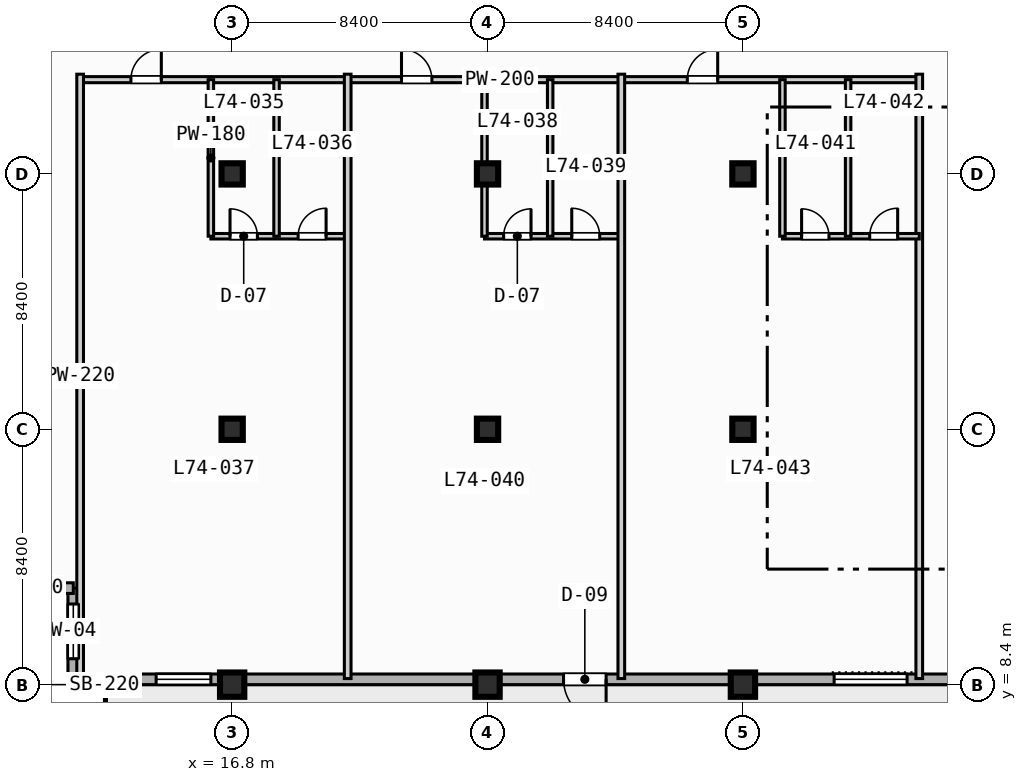
"""IFC4 building model, lengths in metres.
Left out: names, types, materials, properties, quantities, classifications, styles, units other than length and angle.
Written with IfcOpenShell. Run it as: python <this file> out.ifc"""

import sys

from ifc_helpers import new_model, si_unit, direction, frame, frame_2d, origin, origin_2d, place, context, subcontext, project, spatial, rectangle, extrude, element, fill, save


model = new_model("IFC4")
c1 = context("Model", 3, precision=1e-05, world=origin(), true_north=direction((0.0, 1.0)))
c2 = subcontext(c1, "Body", "Model", "MODEL_VIEW")
j1 = project(units=[si_unit("LENGTHUNIT", "METRE"), si_unit("PLANEANGLEUNIT", "RADIAN")], contexts=[c1])
p1 = place(None, origin())
s1 = spatial("IfcSite", under=j1, at=p1, CompositionType="ELEMENT")
p2 = place(p1, origin())
s2 = spatial("IfcBuilding", under=s1, at=p2, CompositionType="ELEMENT")
p3 = place(p2, frame((0.0, 0.0, 300.8)))
s3 = spatial("IfcBuildingStorey", under=s2, at=p3, CompositionType="ELEMENT", Elevation=300.8)
p4 = place(p3, frame((16.8, 8.4, 0.0), z_axis=(0.0, 0.0, 1.0), x_axis=(1.0, 0.0, 0.0)))
e1 = element("IfcColumn", 1, at=p4, inside=s3, PredefinedType="COLUMN", context=c2, shape_type="SweptSolid", body=[
    extrude(rectangle(XDim=0.8, YDim=0.8, at=origin_2d()), origin(), (0.0, 0.0, 1.0), 3.9),
])
for number, where, z_axis, x_axis in (
    (2, (16.8, 16.8, 0.0), (0.0, 0.0, 1.0), (1.0, 0.0, 0.0)),
    (3, (16.8, 25.2, 0.0), (0.0, 0.0, 1.0), (1.0, 0.0, 0.0)),
):
    element("IfcColumn", number, at=place(p3, frame(where, z_axis=z_axis, x_axis=x_axis)), inside=s3, PredefinedType="COLUMN", context=c2, shape_type="SweptSolid", body=[
        extrude(rectangle(XDim=0.7, YDim=0.7, at=origin_2d()), origin(), (0.0, 0.0, 1.0), 3.9),
    ])
p5 = place(p3, frame((25.2, 8.4, 0.0), z_axis=(0.0, 0.0, 1.0), x_axis=(1.0, 0.0, 0.0)))
e4 = element("IfcColumn", 4, at=p5, inside=s3, PredefinedType="COLUMN", context=c2, shape_type="SweptSolid", body=[
    extrude(rectangle(XDim=0.8, YDim=0.8, at=origin_2d()), origin(), (0.0, 0.0, 1.0), 3.9),
])
for number, where, z_axis, x_axis in (
    (5, (25.2, 16.8, 0.0), (0.0, 0.0, 1.0), (1.0, 0.0, 0.0)),
    (6, (25.2, 25.2, 0.0), (0.0, 0.0, 1.0), (1.0, 0.0, 0.0)),
):
    element("IfcColumn", number, at=place(p3, frame(where, z_axis=z_axis, x_axis=x_axis)), inside=s3, PredefinedType="COLUMN", context=c2, shape_type="SweptSolid", body=[
        extrude(rectangle(XDim=0.7, YDim=0.7, at=origin_2d()), origin(), (0.0, 0.0, 1.0), 3.9),
    ])
p6 = place(p3, frame((33.6, 8.4, 0.0), z_axis=(0.0, 0.0, 1.0), x_axis=(1.0, 0.0, 0.0)))
e7 = element("IfcColumn", 7, at=p6, inside=s3, PredefinedType="COLUMN", context=c2, shape_type="SweptSolid", body=[
    extrude(rectangle(XDim=0.8, YDim=0.8, at=origin_2d()), origin(), (0.0, 0.0, 1.0), 3.9),
])
for number, where, z_axis, x_axis in (
    (8, (33.6, 16.8, 0.0), (0.0, 0.0, 1.0), (1.0, 0.0, 0.0)),
    (9, (33.6, 25.2, 0.0), (0.0, 0.0, 1.0), (1.0, 0.0, 0.0)),
):
    element("IfcColumn", number, at=place(p3, frame(where, z_axis=z_axis, x_axis=x_axis)), inside=s3, PredefinedType="COLUMN", context=c2, shape_type="SweptSolid", body=[
        extrude(rectangle(XDim=0.7, YDim=0.7, at=origin_2d()), origin(), (0.0, 0.0, 1.0), 3.9),
    ])
p7 = place(p3, frame((11.575, 8.575, 0.0), z_axis=(0.0, 0.0, 1.0), x_axis=(0.0, 1.0, 0.0)))
e10 = element("IfcWall", 10, at=p7, inside=s3, PredefinedType="STANDARD", context=c2, shape_type="SweptSolid", body=[
    extrude(rectangle(XDim=3.0, YDim=0.35, at=frame_2d((1.5, 0.0))), origin(), (0.0, 0.0, 1.0), 3.67),
])
p8 = place(p7, frame((0.677, 0.0, 0.85)))
e11 = element("IfcOpeningElement", 11, at=p8, cuts=e10, PredefinedType="OPENING", context=c2, shape_type="SweptSolid", body=[
    extrude(rectangle(XDim=1.8, YDim=1.8, at=frame_2d((0.9, 0.9))), frame((0.0, 0.185, 0.0), z_axis=(0.0, -1.0, 0.0), x_axis=(1.0, 0.0, 0.0)), (0.0, 0.0, 1.0), 0.37),
])
p9 = place(p3, frame((11.575, 11.575, 0.0), z_axis=(0.0, 0.0, 1.0), x_axis=(-1.0, 0.0, 0.0)))
e12 = element("IfcWall", 12, at=p9, inside=s3, PredefinedType="STANDARD", context=c2, shape_type="SweptSolid", body=[
    extrude(rectangle(XDim=3.0, YDim=0.35, at=frame_2d((1.5, 0.0))), origin(), (0.0, 0.0, 1.0), 3.67),
])
p10 = place(p3, frame((64.025, 8.575, 0.0), z_axis=(0.0, 0.0, 1.0), x_axis=(-1.0, 0.0, 0.0)))
e13 = element("IfcWall", 13, at=p10, inside=s3, PredefinedType="STANDARD", context=c2, shape_type="SweptSolid", body=[
    extrude(rectangle(XDim=52.45, YDim=0.35, at=frame_2d((26.225, 0.0))), origin(), (0.0, 0.0, 1.0), 3.67),
])
p11 = place(p10, frame((34.925, 0.0, 0.0)))
e14 = element("IfcOpeningElement", 14, at=p11, cuts=e13, PredefinedType="OPENING", context=c2, shape_type="SweptSolid", body=[
    extrude(rectangle(XDim=1.4, YDim=2.2, at=frame_2d((0.7, 1.1))), frame((0.0, 0.185, 0.0), z_axis=(0.0, -1.0, 0.0), x_axis=(1.0, 0.0, 0.0)), (0.0, 0.0, 1.0), 0.37),
])
p12 = place(p10, frame((25.025, 0.0, 0.85)))
e15 = element("IfcOpeningElement", 15, at=p12, cuts=e13, PredefinedType="OPENING", context=c2, shape_type="SweptSolid", body=[
    extrude(rectangle(XDim=2.4, YDim=1.95, at=frame_2d((1.2, 0.975))), frame((0.0, 0.185, 0.0), z_axis=(0.0, -1.0, 0.0), x_axis=(1.0, 0.0, 0.0)), (0.0, 0.0, 1.0), 0.37),
])
p13 = place(p10, frame((16.925, 0.0, 0.85)))
e16 = element("IfcOpeningElement", 16, at=p13, cuts=e13, PredefinedType="OPENING", context=c2, shape_type="SweptSolid", body=[
    extrude(rectangle(XDim=1.8, YDim=1.8, at=frame_2d((0.9, 0.9))), frame((0.0, 0.185, 0.0), z_axis=(0.0, -1.0, 0.0), x_axis=(1.0, 0.0, 0.0)), (0.0, 0.0, 1.0), 0.37),
])
p14 = place(p10, frame((47.925, 0.0, 0.85)))
e17 = element("IfcOpeningElement", 17, at=p14, cuts=e13, PredefinedType="OPENING", context=c2, shape_type="SweptSolid", body=[
    extrude(rectangle(XDim=1.8, YDim=1.8, at=frame_2d((0.9, 0.9))), frame((0.0, 0.185, 0.0), z_axis=(0.0, -1.0, 0.0), x_axis=(1.0, 0.0, 0.0)), (0.0, 0.0, 1.0), 0.37),
])
p15 = place(p3, frame((11.8, 28.3, 0.0), z_axis=(0.0, 0.0, 1.0), x_axis=(1.0, 0.0, 0.0)))
e18 = element("IfcWall", 18, at=p15, inside=s3, PredefinedType="PARTITIONING", context=c2, shape_type="SweptSolid", body=[
    extrude(rectangle(XDim=27.6, YDim=0.2, at=frame_2d((13.8, 0.0))), origin(), (0.0, 0.0, 1.0), 3.67),
])
p16 = place(p15, frame((1.67, 0.0, 0.0)))
e19 = element("IfcOpeningElement", 19, at=p16, cuts=e18, PredefinedType="OPENING", context=c2, shape_type="SweptSolid", body=[
    extrude(rectangle(XDim=1.0, YDim=2.15, at=frame_2d((0.5, 1.075))), frame((0.0, 0.11, 0.0), z_axis=(0.0, -1.0, 0.0), x_axis=(1.0, 0.0, 0.0)), (0.0, 0.0, 1.0), 0.22),
])
p17 = place(p15, frame((10.57, 0.0, 0.0)))
e20 = element("IfcOpeningElement", 20, at=p17, cuts=e18, PredefinedType="OPENING", context=c2, shape_type="SweptSolid", body=[
    extrude(rectangle(XDim=1.0, YDim=2.15, at=frame_2d((0.5, 1.075))), frame((0.0, 0.11, 0.0), z_axis=(0.0, -1.0, 0.0), x_axis=(1.0, 0.0, 0.0)), (0.0, 0.0, 1.0), 0.22),
])
p18 = place(p15, frame((19.97, 0.0, 0.0)))
e21 = element("IfcOpeningElement", 21, at=p18, cuts=e18, PredefinedType="OPENING", context=c2, shape_type="SweptSolid", body=[
    extrude(rectangle(XDim=1.0, YDim=2.15, at=frame_2d((0.5, 1.075))), frame((0.0, 0.11, 0.0), z_axis=(0.0, -1.0, 0.0), x_axis=(1.0, 0.0, 0.0)), (0.0, 0.0, 1.0), 0.22),
])
p19 = place(p3, frame((11.8, 8.6, 0.0), z_axis=(0.0, 0.0, 1.0), x_axis=(0.0, 1.0, 0.0)))
e22 = element("IfcWall", 22, at=p19, inside=s3, PredefinedType="PARTITIONING", context=c2, shape_type="SweptSolid", body=[
    extrude(rectangle(XDim=19.88, YDim=0.22, at=frame_2d((9.94, 0.0))), origin(), (0.0, 0.0, 1.0), 3.67),
])
p20 = place(p3, frame((16.1, 23.15, 0.0), z_axis=(0.0, 0.0, 1.0), x_axis=(1.0, 0.0, 0.0)))
e23 = element("IfcWall", 23, at=p20, inside=s3, PredefinedType="PLUMBINGWALL", context=c2, shape_type="SweptSolid", body=[
    extrude(rectangle(XDim=4.5, YDim=0.18, at=frame_2d((2.25, 0.0))), origin(), (0.0, 0.0, 1.0), 3.67),
])
p21 = place(p20, frame((0.63, 0.0, 0.0)))
e24 = element("IfcOpeningElement", 24, at=p21, cuts=e23, PredefinedType="OPENING", context=c2, shape_type="SweptSolid", body=[
    extrude(rectangle(XDim=0.9, YDim=2.1, at=frame_2d((0.45, 1.05))), frame((0.0, 0.1, 0.0), z_axis=(0.0, -1.0, 0.0), x_axis=(1.0, 0.0, 0.0)), (0.0, 0.0, 1.0), 0.2),
])
p22 = place(p20, frame((2.87, 0.0, 0.0)))
e25 = element("IfcOpeningElement", 25, at=p22, cuts=e23, PredefinedType="OPENING", context=c2, shape_type="SweptSolid", body=[
    extrude(rectangle(XDim=0.92, YDim=2.1, at=frame_2d((0.46, 1.05))), frame((0.0, 0.1, 0.0), z_axis=(0.0, -1.0, 0.0), x_axis=(1.0, 0.0, 0.0)), (0.0, 0.0, 1.0), 0.2),
])
for number, where, z_axis, x_axis in (
    (26, (16.1, 23.15, 0.0), (0.0, 0.0, 1.0), (0.0, 1.0, 0.0)),
    (27, (18.26, 23.15, 0.0), (0.0, 0.0, 1.0), (0.0, 1.0, 0.0)),
):
    element("IfcWall", number, at=place(p3, frame(where, z_axis=z_axis, x_axis=x_axis)), inside=s3, PredefinedType="PLUMBINGWALL", context=c2, shape_type="SweptSolid", body=[
        extrude(rectangle(XDim=5.15, YDim=0.18, at=frame_2d((2.575, 0.0))), origin(), (0.0, 0.0, 1.0), 3.67),
    ])
p23 = place(p3, frame((20.6, 8.6, 0.0), z_axis=(0.0, 0.0, 1.0), x_axis=(0.0, 1.0, 0.0)))
e28 = element("IfcWall", 28, at=p23, inside=s3, PredefinedType="PARTITIONING", context=c2, shape_type="SweptSolid", body=[
    extrude(rectangle(XDim=19.88, YDim=0.22, at=frame_2d((9.94, 0.0))), origin(), (0.0, 0.0, 1.0), 3.67),
])
p24 = place(p3, frame((25.1, 23.15, 0.0), z_axis=(0.0, 0.0, 1.0), x_axis=(1.0, 0.0, 0.0)))
e29 = element("IfcWall", 29, at=p24, inside=s3, PredefinedType="PLUMBINGWALL", context=c2, shape_type="SweptSolid", body=[
    extrude(rectangle(XDim=4.5, YDim=0.18, at=frame_2d((2.25, 0.0))), origin(), (0.0, 0.0, 1.0), 3.67),
])
p25 = place(p24, frame((0.63, 0.0, 0.0)))
e30 = element("IfcOpeningElement", 30, at=p25, cuts=e29, PredefinedType="OPENING", context=c2, shape_type="SweptSolid", body=[
    extrude(rectangle(XDim=0.9, YDim=2.1, at=frame_2d((0.45, 1.05))), frame((0.0, 0.1, 0.0), z_axis=(0.0, -1.0, 0.0), x_axis=(1.0, 0.0, 0.0)), (0.0, 0.0, 1.0), 0.2),
])
p26 = place(p24, frame((2.87, 0.0, 0.0)))
e31 = element("IfcOpeningElement", 31, at=p26, cuts=e29, PredefinedType="OPENING", context=c2, shape_type="SweptSolid", body=[
    extrude(rectangle(XDim=0.92, YDim=2.1, at=frame_2d((0.46, 1.05))), frame((0.0, 0.1, 0.0), z_axis=(0.0, -1.0, 0.0), x_axis=(1.0, 0.0, 0.0)), (0.0, 0.0, 1.0), 0.2),
])
p27 = place(p3, frame((25.1, 23.15, 0.0), z_axis=(0.0, 0.0, 1.0), x_axis=(0.0, 1.0, 0.0)))
e32 = element("IfcWall", 32, at=p27, inside=s3, PredefinedType="PLUMBINGWALL", context=c2, shape_type="SweptSolid", body=[
    extrude(rectangle(XDim=5.15, YDim=0.18, at=frame_2d((2.575, 0.0))), origin(), (0.0, 0.0, 1.0), 3.059),
])
p28 = place(p3, frame((27.26, 23.15, 0.0), z_axis=(0.0, 0.0, 1.0), x_axis=(0.0, 1.0, 0.0)))
e33 = element("IfcWall", 33, at=p28, inside=s3, PredefinedType="PLUMBINGWALL", context=c2, shape_type="SweptSolid", body=[
    extrude(rectangle(XDim=5.15, YDim=0.18, at=frame_2d((2.575, 0.0))), origin(), (0.0, 0.0, 1.0), 3.67),
])
for number, where, z_axis, x_axis in (
    (34, (29.6, 8.6, 0.0), (0.0, 0.0, 1.0), (0.0, 1.0, 0.0)),
    (35, (39.4, 8.6, 0.0), (0.0, 0.0, 1.0), (0.0, 1.0, 0.0)),
):
    element("IfcWall", number, at=place(p3, frame(where, z_axis=z_axis, x_axis=x_axis)), inside=s3, PredefinedType="PARTITIONING", context=c2, shape_type="SweptSolid", body=[
        extrude(rectangle(XDim=19.88, YDim=0.22, at=frame_2d((9.94, 0.0))), origin(), (0.0, 0.0, 1.0), 3.67),
    ])
p29 = place(p3, frame((34.9, 23.15, 0.0), z_axis=(0.0, 0.0, 1.0), x_axis=(1.0, 0.0, 0.0)))
e36 = element("IfcWall", 36, at=p29, inside=s3, PredefinedType="PLUMBINGWALL", context=c2, shape_type="SweptSolid", body=[
    extrude(rectangle(XDim=4.5, YDim=0.18, at=frame_2d((2.25, 0.0))), origin(), (0.0, 0.0, 1.0), 3.67),
])
p30 = place(p29, frame((0.63, 0.0, 0.0)))
e37 = element("IfcOpeningElement", 37, at=p30, cuts=e36, PredefinedType="OPENING", context=c2, shape_type="SweptSolid", body=[
    extrude(rectangle(XDim=0.9, YDim=2.1, at=frame_2d((0.45, 1.05))), frame((0.0, 0.1, 0.0), z_axis=(0.0, -1.0, 0.0), x_axis=(1.0, 0.0, 0.0)), (0.0, 0.0, 1.0), 0.2),
])
p31 = place(p29, frame((2.87, 0.0, 0.0)))
e38 = element("IfcOpeningElement", 38, at=p31, cuts=e36, PredefinedType="OPENING", context=c2, shape_type="SweptSolid", body=[
    extrude(rectangle(XDim=0.92, YDim=2.1, at=frame_2d((0.46, 1.05))), frame((0.0, 0.1, 0.0), z_axis=(0.0, -1.0, 0.0), x_axis=(1.0, 0.0, 0.0)), (0.0, 0.0, 1.0), 0.2),
])
for number, where, z_axis, x_axis in (
    (39, (34.9, 23.15, 0.0), (0.0, 0.0, 1.0), (0.0, 1.0, 0.0)),
    (40, (37.06, 23.15, 0.0), (0.0, 0.0, 1.0), (0.0, 1.0, 0.0)),
):
    element("IfcWall", number, at=place(p3, frame(where, z_axis=z_axis, x_axis=x_axis)), inside=s3, PredefinedType="PLUMBINGWALL", context=c2, shape_type="SweptSolid", body=[
        extrude(rectangle(XDim=5.15, YDim=0.18, at=frame_2d((2.575, 0.0))), origin(), (0.0, 0.0, 1.0), 3.67),
    ])
p32 = place(p8, origin())
e41 = element("IfcWindow", 41, at=p32, inside=s3, PartitioningType="SINGLE_PANEL", PredefinedType="WINDOW", context=c2, shape_type="SweptSolid", body=[
    extrude(rectangle(XDim=1.8, YDim=1.8, at=frame_2d((0.9, 0.9))), frame((0.0, 0.03, 0.0), z_axis=(0.0, -1.0, 0.0), x_axis=(1.0, 0.0, 0.0)), (0.0, 0.0, 1.0), 0.06),
])
fill(e11, e41)
p33 = place(p11, origin())
e42 = element("IfcDoor", 42, at=p33, inside=s3, OperationType="SINGLE_SWING_LEFT", PredefinedType="DOOR", context=c2, shape_type="SweptSolid", body=[
    extrude(rectangle(XDim=1.4, YDim=2.2, at=frame_2d((0.7, 1.1))), frame((0.0, 0.025, 0.0), z_axis=(0.0, -1.0, 0.0), x_axis=(1.0, 0.0, 0.0)), (0.0, 0.0, 1.0), 0.05),
])
fill(e14, e42)
p34 = place(p12, origin())
e43 = element("IfcWindow", 43, at=p34, inside=s3, PartitioningType="SINGLE_PANEL", PredefinedType="WINDOW", context=c2, shape_type="SweptSolid", body=[
    extrude(rectangle(XDim=2.4, YDim=1.95, at=frame_2d((1.2, 0.975))), frame((0.0, 0.03, 0.0), z_axis=(0.0, -1.0, 0.0), x_axis=(1.0, 0.0, 0.0)), (0.0, 0.0, 1.0), 0.06),
])
fill(e15, e43)
p35 = place(p14, origin())
e44 = element("IfcWindow", 44, at=p35, inside=s3, PartitioningType="SINGLE_PANEL", PredefinedType="WINDOW", context=c2, shape_type="SweptSolid", body=[
    extrude(rectangle(XDim=1.8, YDim=1.8, at=frame_2d((0.9, 0.9))), frame((0.0, 0.03, 0.0), z_axis=(0.0, -1.0, 0.0), x_axis=(1.0, 0.0, 0.0)), (0.0, 0.0, 1.0), 0.06),
])
fill(e17, e44)
p36 = place(p16, origin())
e45 = element("IfcDoor", 45, at=p36, inside=s3, OperationType="SINGLE_SWING_RIGHT", PredefinedType="DOOR", context=c2, shape_type="SweptSolid", body=[
    extrude(rectangle(XDim=1.0, YDim=2.15, at=frame_2d((0.5, 1.075))), frame((0.0, 0.025, 0.0), z_axis=(0.0, -1.0, 0.0), x_axis=(1.0, 0.0, 0.0)), (0.0, 0.0, 1.0), 0.05),
])
fill(e19, e45)
p37 = place(p17, origin())
e46 = element("IfcDoor", 46, at=p37, inside=s3, OperationType="SINGLE_SWING_LEFT", PredefinedType="DOOR", context=c2, shape_type="SweptSolid", body=[
    extrude(rectangle(XDim=1.0, YDim=2.15, at=frame_2d((0.5, 1.075))), frame((0.0, 0.025, 0.0), z_axis=(0.0, -1.0, 0.0), x_axis=(1.0, 0.0, 0.0)), (0.0, 0.0, 1.0), 0.05),
])
fill(e20, e46)
p38 = place(p18, origin())
e47 = element("IfcDoor", 47, at=p38, inside=s3, OperationType="SINGLE_SWING_RIGHT", PredefinedType="DOOR", context=c2, shape_type="SweptSolid", body=[
    extrude(rectangle(XDim=1.0, YDim=2.15, at=frame_2d((0.5, 1.075))), frame((0.0, 0.025, 0.0), z_axis=(0.0, -1.0, 0.0), x_axis=(1.0, 0.0, 0.0)), (0.0, 0.0, 1.0), 0.05),
])
fill(e21, e47)
p39 = place(p21, origin())
e48 = element("IfcDoor", 48, at=p39, inside=s3, OperationType="SINGLE_SWING_LEFT", PredefinedType="DOOR", context=c2, shape_type="SweptSolid", body=[
    extrude(rectangle(XDim=0.9, YDim=2.1, at=frame_2d((0.45, 1.05))), frame((0.0, 0.025, 0.0), z_axis=(0.0, -1.0, 0.0), x_axis=(1.0, 0.0, 0.0)), (0.0, 0.0, 1.0), 0.05),
])
fill(e24, e48)
p40 = place(p22, origin())
e49 = element("IfcDoor", 49, at=p40, inside=s3, OperationType="SINGLE_SWING_RIGHT", PredefinedType="DOOR", context=c2, shape_type="SweptSolid", body=[
    extrude(rectangle(XDim=0.92, YDim=2.1, at=frame_2d((0.46, 1.05))), frame((0.0, 0.025, 0.0), z_axis=(0.0, -1.0, 0.0), x_axis=(1.0, 0.0, 0.0)), (0.0, 0.0, 1.0), 0.05),
])
fill(e25, e49)
p41 = place(p25, origin())
e50 = element("IfcDoor", 50, at=p41, inside=s3, OperationType="SINGLE_SWING_RIGHT", PredefinedType="DOOR", context=c2, shape_type="SweptSolid", body=[
    extrude(rectangle(XDim=0.9, YDim=2.1, at=frame_2d((0.45, 1.05))), frame((0.0, 0.025, 0.0), z_axis=(0.0, -1.0, 0.0), x_axis=(1.0, 0.0, 0.0)), (0.0, 0.0, 1.0), 0.05),
])
fill(e30, e50)
p42 = place(p26, origin())
e51 = element("IfcDoor", 51, at=p42, inside=s3, OperationType="SINGLE_SWING_LEFT", PredefinedType="DOOR", context=c2, shape_type="SweptSolid", body=[
    extrude(rectangle(XDim=0.92, YDim=2.1, at=frame_2d((0.46, 1.05))), frame((0.0, 0.025, 0.0), z_axis=(0.0, -1.0, 0.0), x_axis=(1.0, 0.0, 0.0)), (0.0, 0.0, 1.0), 0.05),
])
fill(e31, e51)
p43 = place(p30, origin())
e52 = element("IfcDoor", 52, at=p43, inside=s3, OperationType="SINGLE_SWING_LEFT", PredefinedType="DOOR", context=c2, shape_type="SweptSolid", body=[
    extrude(rectangle(XDim=0.9, YDim=2.1, at=frame_2d((0.45, 1.05))), frame((0.0, 0.025, 0.0), z_axis=(0.0, -1.0, 0.0), x_axis=(1.0, 0.0, 0.0)), (0.0, 0.0, 1.0), 0.05),
])
fill(e37, e52)
p44 = place(p31, origin())
e53 = element("IfcDoor", 53, at=p44, inside=s3, OperationType="SINGLE_SWING_RIGHT", PredefinedType="DOOR", context=c2, shape_type="SweptSolid", body=[
    extrude(rectangle(XDim=0.92, YDim=2.1, at=frame_2d((0.46, 1.05))), frame((0.0, 0.025, 0.0), z_axis=(0.0, -1.0, 0.0), x_axis=(1.0, 0.0, 0.0)), (0.0, 0.0, 1.0), 0.05),
])
fill(e38, e53)
save(model, sys.argv[1])
